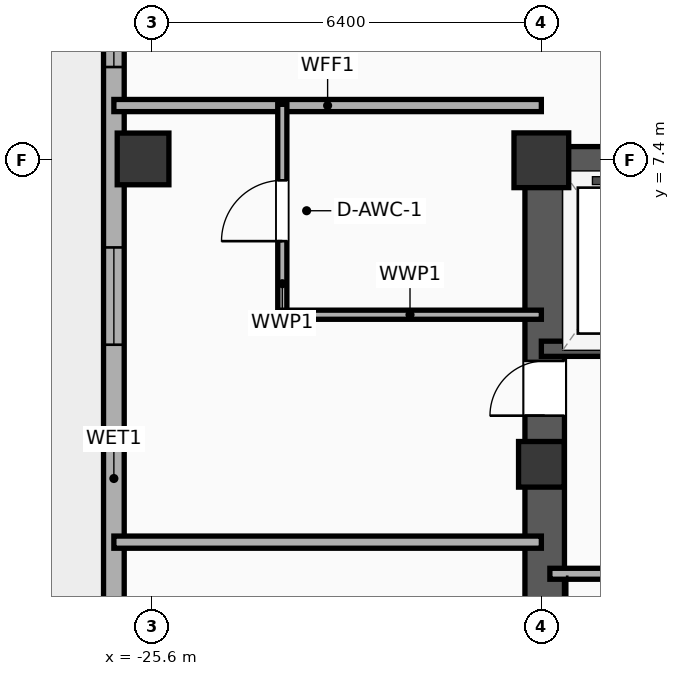
"""IFC4 building model, lengths in metres.
Left out: names, types, materials, properties, quantities, classifications, styles, units other than length and angle.
Written with IfcOpenShell. Run it as: python <this file> out.ifc"""

import sys

from ifc_helpers import new_model, si_unit, direction, frame, frame_2d, origin, origin_2d, place, context, subcontext, project, spatial, rectangle, hollow_rectangle, extrude, element, fill, save


model = new_model("IFC4")
c1 = context("Model", 3, precision=1e-05, world=origin(), true_north=direction((0.0, 1.0)))
c2 = subcontext(c1, "Body", "Model", "MODEL_VIEW")
j1 = project(units=[si_unit("LENGTHUNIT", "METRE"), si_unit("PLANEANGLEUNIT", "RADIAN")], contexts=[c1])
p1 = place(None, origin())
s1 = spatial("IfcSite", under=j1, at=p1, CompositionType="ELEMENT")
p2 = place(p1, origin())
s2 = spatial("IfcBuilding", under=s1, at=p2, CompositionType="ELEMENT")
p3 = place(p2, frame((0.0, 0.0, 195.0)))
s3 = spatial("IfcBuildingStorey", under=s2, at=p3, CompositionType="ELEMENT", Elevation=195.0)
p4 = place(p3, frame((-19.2, 2.4, 0.0), z_axis=(0.0, 0.0, 1.0), x_axis=(1.0, 0.0, 0.0)))
e1 = element("IfcColumn", 1, at=p4, inside=s3, PredefinedType="COLUMN", context=c2, shape_type="SweptSolid", body=[
    extrude(rectangle(XDim=0.75, YDim=0.75, at=origin_2d()), origin(), (0.0, 0.0, 1.0), 5.2),
])
p5 = place(p3, frame((-19.2, 7.4, 0.0), z_axis=(0.0, 0.0, 1.0), x_axis=(1.0, 0.0, 0.0)))
e2 = element("IfcColumn", 2, at=p5, inside=s3, PredefinedType="COLUMN", context=c2, shape_type="SweptSolid", body=[
    extrude(rectangle(XDim=0.9, YDim=0.9, at=origin_2d()), origin(), (0.0, 0.0, 1.0), 5.2),
])
p6 = place(p3, frame((-19.425, 7.4, 0.0), z_axis=(0.0, 0.0, 1.0), x_axis=(1.0, 0.0, 0.0)))
e3 = element("IfcWall", 3, at=p6, inside=s3, PredefinedType="SHEAR", context=c2, shape_type="SweptSolid", body=[
    extrude(rectangle(XDim=7.25, YDim=0.45, at=frame_2d((3.625, 0.0))), origin(), (0.0, 0.0, 1.0), 4.8),
])
p7 = place(p3, frame((-19.145, -7.4, 0.0), z_axis=(0.0, 0.0, 1.0), x_axis=(0.0, 1.0, 0.0)))
e4 = element("IfcWall", 4, at=p7, inside=s3, PredefinedType="SHEAR", context=c2, shape_type="SweptSolid", body=[
    extrude(rectangle(XDim=14.8, YDim=0.65, at=frame_2d((7.4, 0.0))), origin(), (0.0, 0.0, 1.0), 4.8),
])
p8 = place(p7, frame((10.6, 0.0, 0.0)))
e5 = element("IfcOpeningElement", 5, at=p8, cuts=e4, PredefinedType="OPENING", context=c2, shape_type="SweptSolid", body=[
    extrude(rectangle(XDim=0.9, YDim=2.05, at=frame_2d((0.45, 1.025))), frame((0.0, 0.335, 0.0), z_axis=(0.0, -1.0, 0.0), x_axis=(1.0, 0.0, 0.0)), (0.0, 0.0, 1.0), 0.67),
])
p9 = place(p3, frame((-25.75, 7.422, -0.4), z_axis=(0.0, 0.0, 1.0), x_axis=(1.0, 0.0, 0.0)))
e6 = element("IfcColumn", 6, at=p9, inside=s3, PredefinedType="COLUMN", context=c2, shape_type="SweptSolid", body=[
    extrude(hollow_rectangle(XDim=0.85, YDim=0.85, WallThickness=0.028, at=origin_2d()), origin(), (0.0, 0.0, 1.0), 5.6),
])
p10 = place(p3, frame((-26.23, -15.383, 0.0), z_axis=(0.0, 0.0, 1.0), x_axis=(0.0, 1.0, 0.0)))
e7 = element("IfcWall", 7, at=p10, inside=s3, PredefinedType="ELEMENTEDWALL", context=c2, shape_type="SweptSolid", body=[
    extrude(rectangle(XDim=31.967, YDim=0.34, at=frame_2d((15.983, 0.0))), origin(), (0.0, 0.0, 1.0), 3.69),
])
p11 = place(p10, frame((1.483, 0.0, 0.0)))
e8 = element("IfcOpeningElement", 8, at=p11, cuts=e7, PredefinedType="OPENING", context=c2, shape_type="SweptSolid", body=[
    extrude(rectangle(XDim=1.5, YDim=2.05, at=frame_2d((0.75, 1.025))), frame((0.0, 0.18, 0.0), z_axis=(0.0, -1.0, 0.0), x_axis=(1.0, 0.0, 0.0)), (0.0, 0.0, 1.0), 0.36),
])
p12 = place(p10, frame((6.05, 0.0, 0.75)))
e9 = element("IfcOpeningElement", 9, at=p12, cuts=e7, PredefinedType="OPENING", context=c2, shape_type="SweptSolid", body=[
    extrude(rectangle(XDim=1.6, YDim=1.4, at=frame_2d((0.8, 0.7))), frame((0.0, 0.18, 0.0), z_axis=(0.0, -1.0, 0.0), x_axis=(1.0, 0.0, 0.0)), (0.0, 0.0, 1.0), 0.36),
])
p13 = place(p10, frame((10.617, 0.0, 0.75)))
e10 = element("IfcOpeningElement", 10, at=p13, cuts=e7, PredefinedType="OPENING", context=c2, shape_type="SweptSolid", body=[
    extrude(rectangle(XDim=1.6, YDim=1.4, at=frame_2d((0.8, 0.7))), frame((0.0, 0.18, 0.0), z_axis=(0.0, -1.0, 0.0), x_axis=(1.0, 0.0, 0.0)), (0.0, 0.0, 1.0), 0.36),
])
p14 = place(p10, frame((19.75, 0.0, 0.75)))
e11 = element("IfcOpeningElement", 11, at=p14, cuts=e7, PredefinedType="OPENING", context=c2, shape_type="SweptSolid", body=[
    extrude(rectangle(XDim=1.6, YDim=1.4, at=frame_2d((0.8, 0.7))), frame((0.0, 0.18, 0.0), z_axis=(0.0, -1.0, 0.0), x_axis=(1.0, 0.0, 0.0)), (0.0, 0.0, 1.0), 0.36),
])
p15 = place(p10, frame((24.317, 0.0, 0.75)))
e12 = element("IfcOpeningElement", 12, at=p15, cuts=e7, PredefinedType="OPENING", context=c2, shape_type="SweptSolid", body=[
    extrude(rectangle(XDim=1.6, YDim=1.4, at=frame_2d((0.8, 0.7))), frame((0.0, 0.18, 0.0), z_axis=(0.0, -1.0, 0.0), x_axis=(1.0, 0.0, 0.0)), (0.0, 0.0, 1.0), 0.36),
])
p16 = place(p10, frame((28.883, 0.0, 0.75)))
e13 = element("IfcOpeningElement", 13, at=p16, cuts=e7, PredefinedType="OPENING", context=c2, shape_type="SweptSolid", body=[
    extrude(rectangle(XDim=1.6, YDim=1.4, at=frame_2d((0.8, 0.7))), frame((0.0, 0.18, 0.0), z_axis=(0.0, -1.0, 0.0), x_axis=(1.0, 0.0, 0.0)), (0.0, 0.0, 1.0), 0.36),
])
p17 = place(p3, frame((-19.2, 4.3, 0.0), z_axis=(0.0, 0.0, 1.0), x_axis=(1.0, 0.0, 0.0)))
e14 = element("IfcWall", 14, at=p17, inside=s3, PredefinedType="SOLIDWALL", context=c2, shape_type="SweptSolid", body=[
    extrude(rectangle(XDim=2.6, YDim=0.25, at=frame_2d((1.3, 0.0))), origin(), (0.0, 0.0, 1.0), 4.8),
])
p18 = place(p3, frame((-19.06, 0.6, 0.0), z_axis=(0.0, 0.0, 1.0), x_axis=(1.0, 0.0, 0.0)))
e15 = element("IfcWall", 15, at=p18, inside=s3, PredefinedType="PARTITIONING", context=c2, shape_type="SweptSolid", body=[
    extrude(rectangle(XDim=3.36, YDim=0.18, at=frame_2d((1.68, 0.0))), origin(), (0.0, 0.0, 1.0), 4.8),
])
p19 = place(p18, frame((1.155, 0.0, 0.0)))
e16 = element("IfcOpeningElement", 16, at=p19, cuts=e15, PredefinedType="OPENING", context=c2, shape_type="SweptSolid", body=[
    extrude(rectangle(XDim=1.05, YDim=2.05, at=frame_2d((0.525, 1.025))), frame((0.0, 0.1, 0.0), z_axis=(0.0, -1.0, 0.0), x_axis=(1.0, 0.0, 0.0)), (0.0, 0.0, 1.0), 0.2),
])
for number, where, z_axis, x_axis in (
    (17, (-26.23, 1.12, 0.0), (0.0, 0.0, 1.0), (1.0, 0.0, 0.0)),
    (18, (-26.23, 8.3, 0.0), (0.0, 0.0, 1.0), (1.0, 0.0, 0.0)),
):
    element("IfcWall", number, at=place(p3, frame(where, z_axis=z_axis, x_axis=x_axis)), inside=s3, PredefinedType="PARTITIONING", context=c2, shape_type="SweptSolid", body=[
        extrude(rectangle(XDim=7.03, YDim=0.2, at=frame_2d((3.515, 0.0))), origin(), (0.0, 0.0, 1.0), 4.8),
    ])
p20 = place(p3, frame((-23.46, 4.82, 0.0), z_axis=(0.0, 0.0, 1.0), x_axis=(0.0, 1.0, 0.0)))
e19 = element("IfcWall", 19, at=p20, inside=s3, PredefinedType="PLUMBINGWALL", context=c2, shape_type="SweptSolid", body=[
    extrude(rectangle(XDim=3.5, YDim=0.15, at=frame_2d((1.75, 0.0))), origin(), (0.0, 0.0, 1.0), 4.8),
])
p21 = place(p20, frame((1.25, 0.0, 0.0)))
e20 = element("IfcOpeningElement", 20, at=p21, cuts=e19, PredefinedType="OPENING", context=c2, shape_type="SweptSolid", body=[
    extrude(rectangle(XDim=1.0, YDim=2.05, at=frame_2d((0.5, 1.025))), frame((0.0, 0.085, 0.0), z_axis=(0.0, -1.0, 0.0), x_axis=(1.0, 0.0, 0.0)), (0.0, 0.0, 1.0), 0.17),
])
p22 = place(p3, frame((-23.52, 4.86, 0.0), z_axis=(0.0, 0.0, 1.0), x_axis=(1.0, 0.0, 0.0)))
e21 = element("IfcWall", 21, at=p22, inside=s3, PredefinedType="PLUMBINGWALL", context=c2, shape_type="SweptSolid", body=[
    extrude(rectangle(XDim=4.32, YDim=0.15, at=frame_2d((2.16, 0.0))), origin(), (0.0, 0.0, 1.0), 4.8),
])
p23 = place(p14, origin())
e22 = element("IfcWindow", 22, at=p23, inside=s3, PartitioningType="SINGLE_PANEL", PredefinedType="WINDOW", context=c2, shape_type="SweptSolid", body=[
    extrude(rectangle(XDim=1.6, YDim=1.4, at=frame_2d((0.8, 0.7))), frame((0.0, 0.03, 0.0), z_axis=(0.0, -1.0, 0.0), x_axis=(1.0, 0.0, 0.0)), (0.0, 0.0, 1.0), 0.06),
])
fill(e11, e22)
p24 = place(p15, origin())
e23 = element("IfcWindow", 23, at=p24, inside=s3, PartitioningType="SINGLE_PANEL", PredefinedType="WINDOW", context=c2, shape_type="SweptSolid", body=[
    extrude(rectangle(XDim=1.6, YDim=1.4, at=frame_2d((0.8, 0.7))), frame((0.0, 0.03, 0.0), z_axis=(0.0, -1.0, 0.0), x_axis=(1.0, 0.0, 0.0)), (0.0, 0.0, 1.0), 0.06),
])
fill(e12, e23)
p25 = place(p21, origin())
e24 = element("IfcDoor", 24, at=p25, inside=s3, OperationType="SINGLE_SWING_LEFT", PredefinedType="DOOR", context=c2, shape_type="SweptSolid", body=[
    extrude(rectangle(XDim=1.0, YDim=2.05, at=frame_2d((0.5, 1.025))), frame((0.0, 0.025, 0.0), z_axis=(0.0, -1.0, 0.0), x_axis=(1.0, 0.0, 0.0)), (0.0, 0.0, 1.0), 0.05),
])
fill(e20, e24)
p26 = place(p8, origin())
e25 = element("IfcDoor", 25, at=p26, inside=s3, OperationType="SINGLE_SWING_LEFT", PredefinedType="DOOR", context=c2, shape_type="SweptSolid", body=[
    extrude(rectangle(XDim=0.9, YDim=2.05, at=frame_2d((0.45, 1.025))), frame((0.0, 0.025, 0.0), z_axis=(0.0, -1.0, 0.0), x_axis=(1.0, 0.0, 0.0)), (0.0, 0.0, 1.0), 0.05),
])
fill(e5, e25)
save(model, sys.argv[1])
